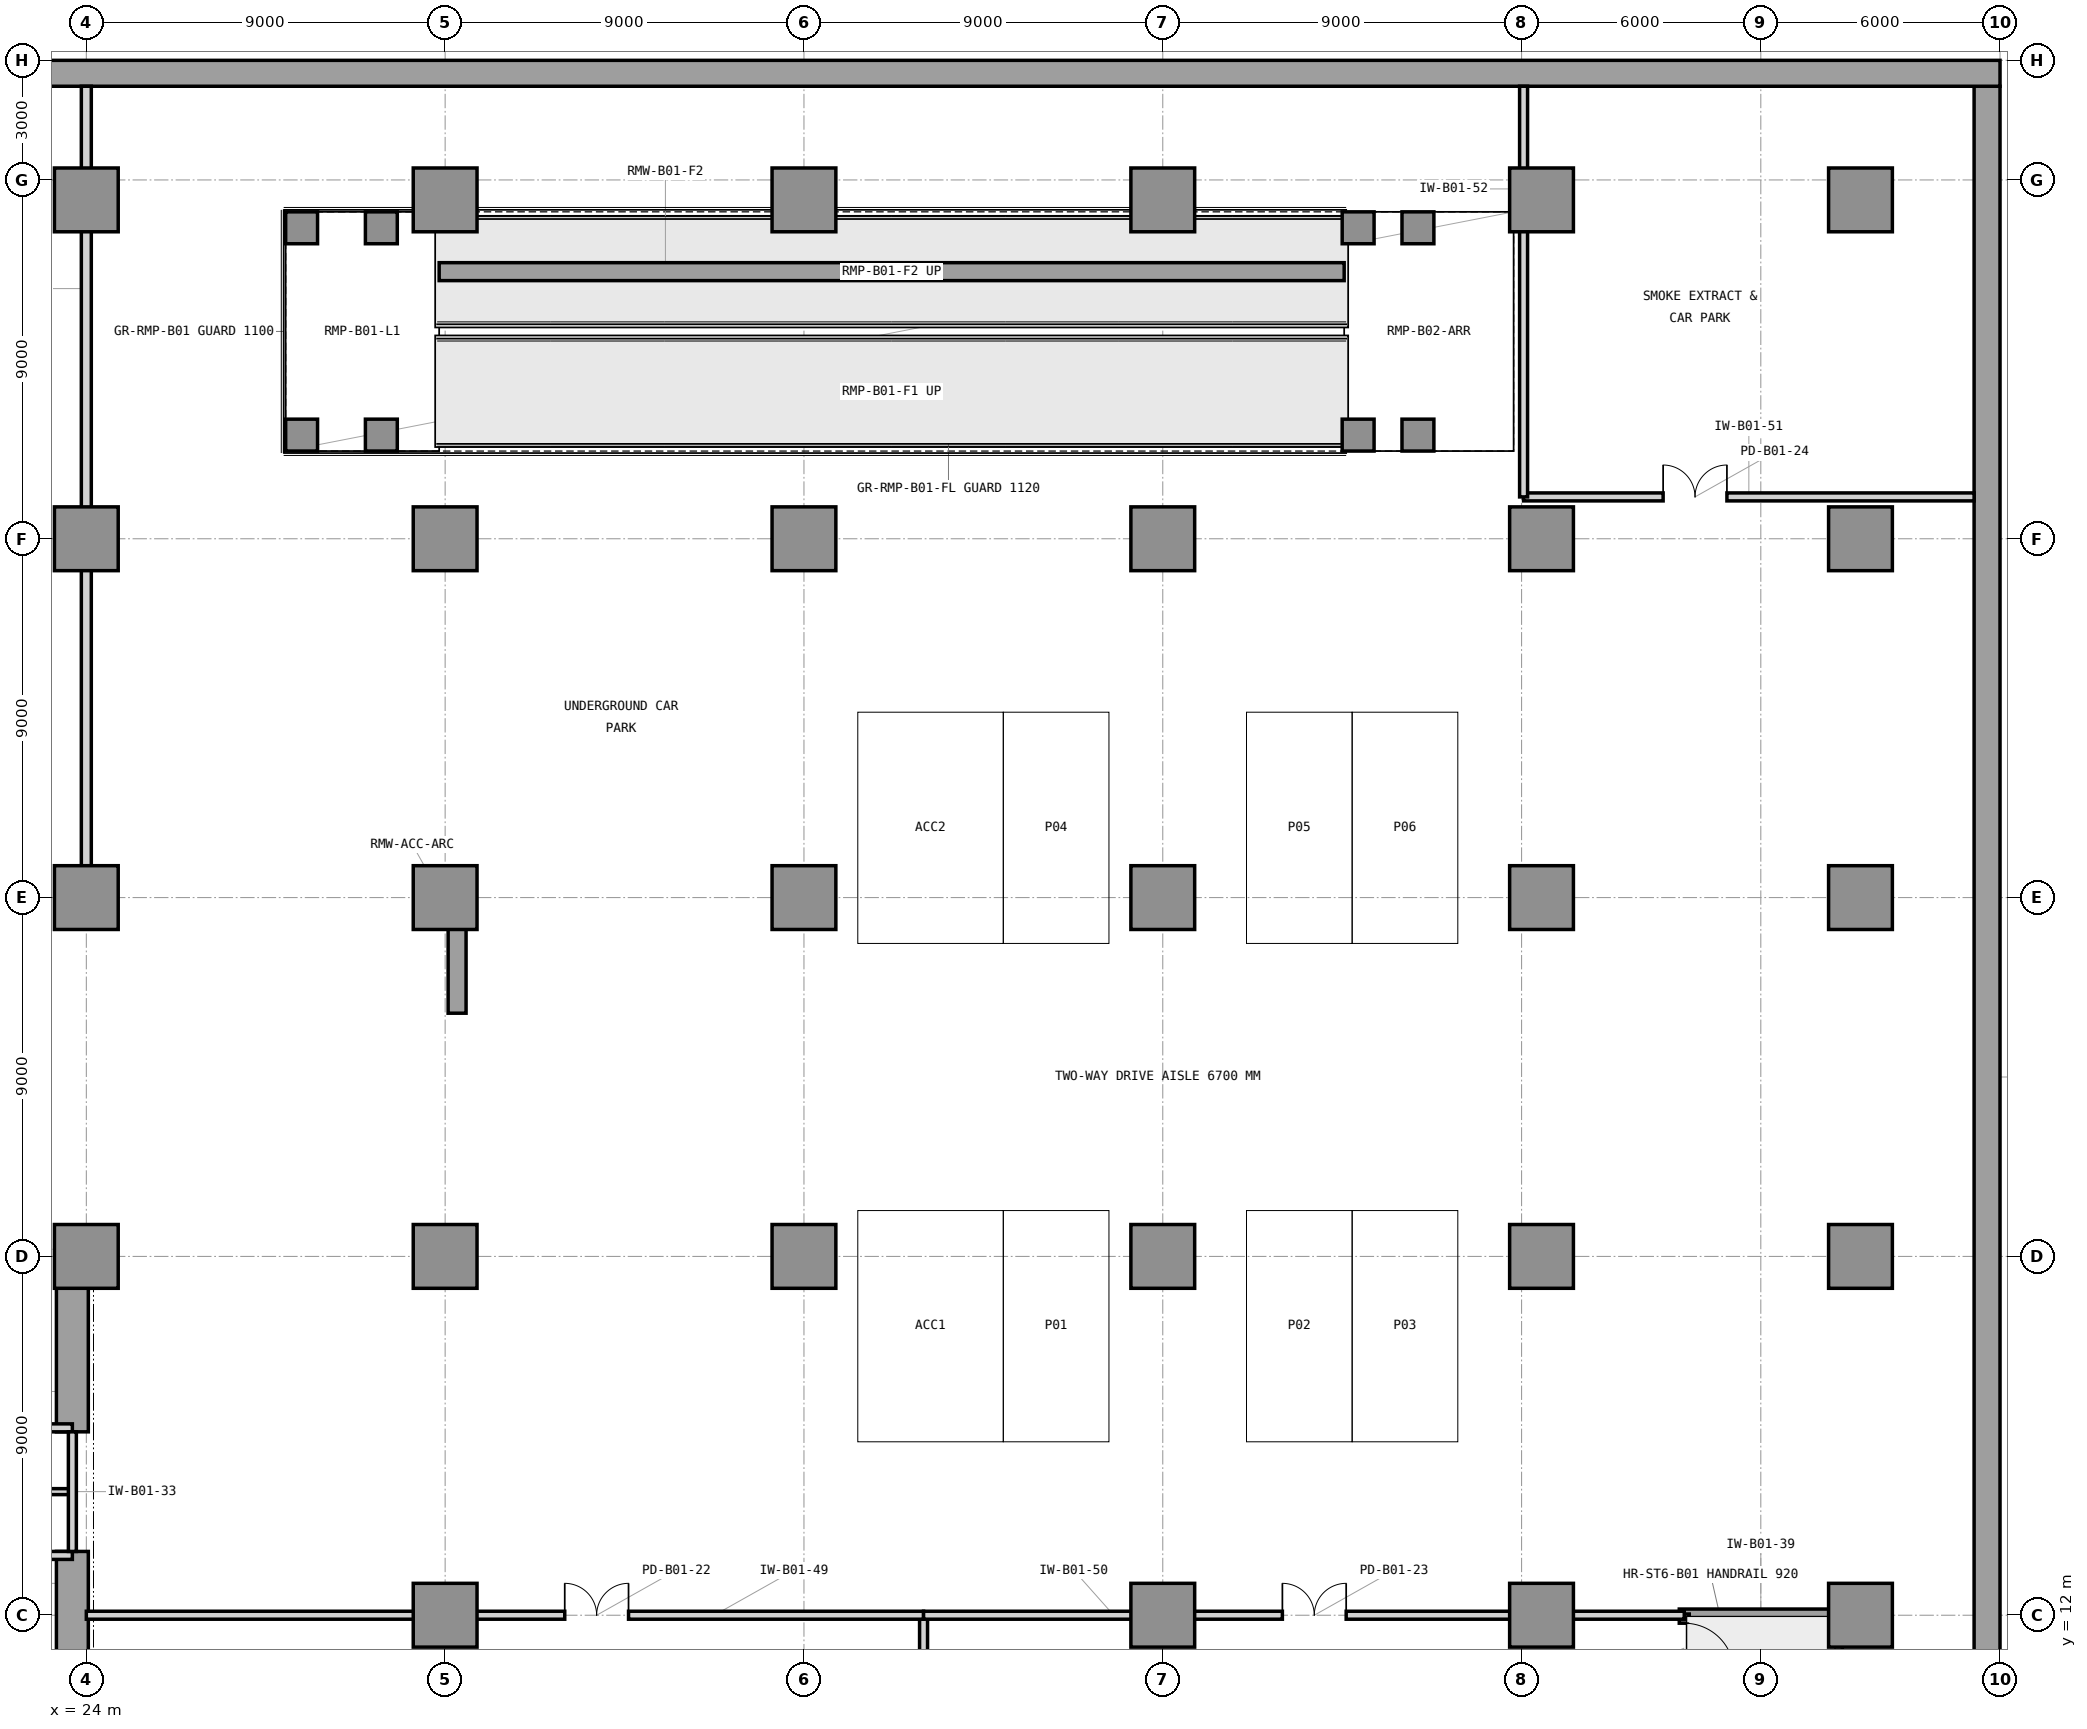
"""IFC4 building model, lengths in metres.
Left out: names, types, materials, properties, quantities, classifications, styles, units other than length and angle.
Written with IfcOpenShell. Run it as: python <this file> out.ifc"""

import sys

from ifc_helpers import new_model, si_unit, direction, frame, frame_2d, origin, origin_2d, place, context, subcontext, project, spatial, rectangle, extrude, element, fill, save


model = new_model("IFC4")
c1 = context("Model", 3, precision=1e-05, world=origin(), true_north=direction((0.0, 1.0)))
c2 = subcontext(c1, "Body", "Model", "MODEL_VIEW")
j1 = project(units=[si_unit("LENGTHUNIT", "METRE"), si_unit("PLANEANGLEUNIT", "RADIAN")], contexts=[c1])
p1 = place(None, origin())
s1 = spatial("IfcSite", under=j1, at=p1, CompositionType="ELEMENT")
p2 = place(p1, origin())
s2 = spatial("IfcBuilding", under=s1, at=p2, CompositionType="ELEMENT")
p3 = place(p2, frame((0.0, 0.0, -4.5)))
s3 = spatial("IfcBuildingStorey", under=s2, at=p3, CompositionType="ELEMENT", Elevation=-4.5)
p4 = place(p3, frame((71.675, 0.65, 0.0), z_axis=(0.0, 0.0, 1.0), x_axis=(0.0, 1.0, 0.0)))
e1 = element("IfcWall", 1, at=p4, inside=s3, PredefinedType="USERDEFINED", context=c2, shape_type="SweptSolid", body=[
    extrude(rectangle(XDim=49.7, YDim=0.65, at=frame_2d((24.85, 0.0))), origin(), (0.0, 0.0, 1.0), 4.5),
])
p5 = place(p3, frame((72.0, 50.675, 0.0), z_axis=(0.0, 0.0, 1.0), x_axis=(-1.0, 0.0, 0.0)))
e2 = element("IfcWall", 2, at=p5, inside=s3, PredefinedType="USERDEFINED", context=c2, shape_type="SweptSolid", body=[
    extrude(rectangle(XDim=72.0, YDim=0.65, at=frame_2d((36.0, 0.0))), origin(), (0.0, 0.0, 1.0), 4.5),
])
p6 = place(p3, frame((23.65, 10.4, 0.0), z_axis=(0.0, 0.0, 1.0), x_axis=(0.0, 1.0, 0.0)))
e3 = element("IfcWall", 3, at=p6, inside=s3, PredefinedType="SHEAR", context=c2, shape_type="SweptSolid", body=[
    extrude(rectangle(XDim=3.2, YDim=0.8, at=frame_2d((1.6, 0.0))), origin(), (0.0, 0.0, 1.0), 4.5),
])
p7 = place(p3, frame((23.65, 16.6, 0.0), z_axis=(0.0, 0.0, 1.0), x_axis=(0.0, 1.0, 0.0)))
e4 = element("IfcWall", 4, at=p7, inside=s3, PredefinedType="SHEAR", context=c2, shape_type="SweptSolid", body=[
    extrude(rectangle(XDim=4.05, YDim=0.8, at=frame_2d((2.025, 0.0))), origin(), (0.0, 0.0, 1.0), 4.5),
])
for number, where, z_axis, x_axis in (
    (5, (24.0, 21.0, 0.0), (0.0, 0.0, 1.0), (1.0, 0.0, 0.0)),
    (6, (24.0, 30.0, 0.0), (0.0, 0.0, 1.0), (1.0, 0.0, 0.0)),
    (7, (24.0, 39.0, 0.0), (0.0, 0.0, 1.0), (1.0, 0.0, 0.0)),
    (8, (24.0, 47.5, 0.0), (0.0, 0.0, 1.0), (1.0, 0.0, 0.0)),
    (9, (33.0, 12.0, 0.0), (0.0, 0.0, 1.0), (1.0, 0.0, 0.0)),
    (10, (33.0, 21.0, 0.0), (0.0, 0.0, 1.0), (1.0, 0.0, 0.0)),
    (11, (33.0, 30.0, 0.0), (0.0, 0.0, 1.0), (1.0, 0.0, 0.0)),
    (12, (33.0, 39.0, 0.0), (0.0, 0.0, 1.0), (1.0, 0.0, 0.0)),
    (13, (33.0, 47.5, 0.0), (0.0, 0.0, 1.0), (1.0, 0.0, 0.0)),
    (14, (42.0, 21.0, 0.0), (0.0, 0.0, 1.0), (1.0, 0.0, 0.0)),
    (15, (42.0, 30.0, 0.0), (0.0, 0.0, 1.0), (1.0, 0.0, 0.0)),
    (16, (42.0, 39.0, 0.0), (0.0, 0.0, 1.0), (1.0, 0.0, 0.0)),
    (17, (42.0, 47.5, 0.0), (0.0, 0.0, 1.0), (1.0, 0.0, 0.0)),
    (18, (51.0, 12.0, 0.0), (0.0, 0.0, 1.0), (1.0, 0.0, 0.0)),
    (19, (51.0, 21.0, 0.0), (0.0, 0.0, 1.0), (1.0, 0.0, 0.0)),
    (20, (51.0, 30.0, 0.0), (0.0, 0.0, 1.0), (1.0, 0.0, 0.0)),
    (21, (51.0, 39.0, 0.0), (0.0, 0.0, 1.0), (1.0, 0.0, 0.0)),
    (22, (51.0, 47.5, 0.0), (0.0, 0.0, 1.0), (1.0, 0.0, 0.0)),
    (23, (60.5, 12.0, 0.0), (0.0, 0.0, 1.0), (1.0, 0.0, 0.0)),
    (24, (60.5, 21.0, 0.0), (0.0, 0.0, 1.0), (1.0, 0.0, 0.0)),
    (25, (60.5, 30.0, 0.0), (0.0, 0.0, 1.0), (1.0, 0.0, 0.0)),
    (26, (60.5, 39.0, 0.0), (0.0, 0.0, 1.0), (1.0, 0.0, 0.0)),
    (27, (60.5, 47.5, 0.0), (0.0, 0.0, 1.0), (1.0, 0.0, 0.0)),
    (28, (68.5, 12.0, 0.0), (0.0, 0.0, 1.0), (1.0, 0.0, 0.0)),
    (29, (68.5, 21.0, 0.0), (0.0, 0.0, 1.0), (1.0, 0.0, 0.0)),
    (30, (68.5, 30.0, 0.0), (0.0, 0.0, 1.0), (1.0, 0.0, 0.0)),
    (31, (68.5, 39.0, 0.0), (0.0, 0.0, 1.0), (1.0, 0.0, 0.0)),
    (32, (68.5, 47.5, 0.0), (0.0, 0.0, 1.0), (1.0, 0.0, 0.0)),
):
    element("IfcColumn", number, at=place(p3, frame(where, z_axis=z_axis, x_axis=x_axis)), inside=s3, PredefinedType="COLUMN", context=c2, shape_type="SweptSolid", body=[
        extrude(rectangle(XDim=1.6, YDim=1.6, at=origin_2d()), origin(), (0.0, 0.0, 1.0), 4.5),
    ])
p8 = place(p3, frame((16.45, 16.7, 0.0), z_axis=(0.0, 0.0, 1.0), x_axis=(1.0, 0.0, 0.0)))
e33 = element("IfcWall", 33, at=p8, inside=s3, PredefinedType="PARTITIONING", context=c2, shape_type="SweptSolid", body=[
    extrude(rectangle(XDim=7.2, YDim=0.2, at=frame_2d((3.6, 0.0))), origin(), (0.0, 0.0, 1.0), 3.573),
])
p9 = place(p8, frame((0.25, 0.0, 0.0)))
e34 = element("IfcOpeningElement", 34, at=p9, cuts=e33, PredefinedType="OPENING", context=c2, shape_type="SweptSolid", body=[
    extrude(rectangle(XDim=1.2, YDim=2.2, at=frame_2d((0.6, 1.1))), frame((0.0, 0.11, 0.0), z_axis=(0.0, -1.0, 0.0), x_axis=(1.0, 0.0, 0.0)), (0.0, 0.0, 1.0), 0.22),
])
p10 = place(p3, frame((14.7, 13.5, 0.0), z_axis=(0.0, 0.0, 1.0), x_axis=(1.0, 0.0, 0.0)))
e35 = element("IfcWall", 35, at=p10, inside=s3, PredefinedType="PARTITIONING", context=c2, shape_type="SweptSolid", body=[
    extrude(rectangle(XDim=8.95, YDim=0.2, at=frame_2d((4.475, 0.0))), origin(), (0.0, 0.0, 1.0), 3.573),
])
p11 = place(p3, frame((18.25, 15.1, 0.0), z_axis=(0.0, 0.0, 1.0), x_axis=(1.0, 0.0, 0.0)))
e36 = element("IfcWall", 36, at=p11, inside=s3, PredefinedType="PARTITIONING", context=c2, shape_type="SweptSolid", body=[
    extrude(rectangle(XDim=5.4, YDim=0.15, at=frame_2d((2.7, 0.0))), origin(), (0.0, 0.0, 1.0), 4.19),
])
p12 = place(p3, frame((23.65, 13.6, 0.0), z_axis=(0.0, 0.0, 1.0), x_axis=(0.0, 1.0, 0.0)))
e37 = element("IfcWall", 37, at=p12, inside=s3, PredefinedType="PARTITIONING", context=c2, shape_type="SweptSolid", body=[
    extrude(rectangle(XDim=3.0, YDim=0.2, at=frame_2d((1.5, 0.0))), origin(), (0.0, 0.0, 1.0), 4.19),
])
p13 = place(p3, frame((63.955, 12.03, 0.0), z_axis=(0.0, 0.0, 1.0), x_axis=(1.0, 0.0, 0.0)))
e38 = element("IfcWall", 38, at=p13, inside=s3, PredefinedType="SHEAR", context=c2, shape_type="SweptSolid", body=[
    extrude(rectangle(XDim=4.09, YDim=0.25, at=frame_2d((2.045, 0.0))), origin(), (0.0, 0.0, 1.0), 4.5),
])
p14 = place(p3, frame((67.92, 4.53, 0.0), z_axis=(0.0, 0.0, 1.0), x_axis=(0.0, 1.0, 0.0)))
e39 = element("IfcWall", 39, at=p14, inside=s3, PredefinedType="SHEAR", context=c2, shape_type="SweptSolid", body=[
    extrude(rectangle(XDim=7.5, YDim=0.25, at=frame_2d((3.75, 0.0))), origin(), (0.0, 0.0, 1.0), 4.5),
])
p15 = place(p3, frame((64.08, 4.53, 0.0), z_axis=(0.0, 0.0, 1.0), x_axis=(0.0, 1.0, 0.0)))
e40 = element("IfcWall", 40, at=p15, inside=s3, PredefinedType="SHEAR", context=c2, shape_type="SweptSolid", body=[
    extrude(rectangle(XDim=7.5, YDim=0.25, at=frame_2d((3.75, 0.0))), origin(), (0.0, 0.0, 1.0), 4.5),
])
p16 = place(p15, frame((6.02, 0.0, 0.0)))
e41 = element("IfcOpeningElement", 41, at=p16, cuts=e40, PredefinedType="OPENING", context=c2, shape_type="SweptSolid", body=[
    extrude(rectangle(XDim=1.25, YDim=2.2, at=frame_2d((0.625, 1.1))), frame((0.0, 0.135, 0.0), z_axis=(0.0, -1.0, 0.0), x_axis=(1.0, 0.0, 0.0)), (0.0, 0.0, 1.0), 0.27),
])
p17 = place(p3, frame((24.0, 30.05, 0.0), z_axis=(0.0, 0.0, 1.0), x_axis=(0.0, 1.0, 0.0)))
e42 = element("IfcWall", 42, at=p17, inside=s3, PredefinedType="PARTITIONING", context=c2, shape_type="SweptSolid", body=[
    extrude(rectangle(XDim=20.3, YDim=0.25, at=frame_2d((10.15, 0.0))), origin(), (0.0, 0.0, 1.0), 3.334),
])
p18 = place(p3, frame((45.0, 0.65, 0.0), z_axis=(0.0, 0.0, 1.0), x_axis=(0.0, 1.0, 0.0)))
e43 = element("IfcWall", 43, at=p18, inside=s3, PredefinedType="PARTITIONING", context=c2, shape_type="SweptSolid", body=[
    extrude(rectangle(XDim=11.35, YDim=0.2, at=frame_2d((5.675, 0.0))), origin(), (0.0, 0.0, 1.0), 4.19),
])
p19 = place(p3, frame((24.0, 12.0, 0.0), z_axis=(0.0, 0.0, 1.0), x_axis=(1.0, 0.0, 0.0)))
e44 = element("IfcWall", 44, at=p19, inside=s3, PredefinedType="PARTITIONING", context=c2, shape_type="SweptSolid", body=[
    extrude(rectangle(XDim=21.0, YDim=0.2, at=frame_2d((10.5, 0.0))), origin(), (0.0, 0.0, 1.0), 3.334),
])
p20 = place(p19, frame((12.0, 0.0, 0.0)))
e45 = element("IfcOpeningElement", 45, at=p20, cuts=e44, PredefinedType="OPENING", context=c2, shape_type="SweptSolid", body=[
    extrude(rectangle(XDim=1.6, YDim=2.3, at=frame_2d((0.8, 1.15))), frame((0.0, 0.11, 0.0), z_axis=(0.0, -1.0, 0.0), x_axis=(1.0, 0.0, 0.0)), (0.0, 0.0, 1.0), 0.22),
])
p21 = place(p3, frame((45.0, 12.0, 0.0), z_axis=(0.0, 0.0, 1.0), x_axis=(1.0, 0.0, 0.0)))
e46 = element("IfcWall", 46, at=p21, inside=s3, PredefinedType="PARTITIONING", context=c2, shape_type="SweptSolid", body=[
    extrude(rectangle(XDim=19.08, YDim=0.2, at=frame_2d((9.54, 0.0))), origin(), (0.0, 0.0, 1.0), 3.334),
])
p22 = place(p21, frame((9.0, 0.0, 0.0)))
e47 = element("IfcOpeningElement", 47, at=p22, cuts=e46, PredefinedType="OPENING", context=c2, shape_type="SweptSolid", body=[
    extrude(rectangle(XDim=1.6, YDim=2.3, at=frame_2d((0.8, 1.15))), frame((0.0, 0.11, 0.0), z_axis=(0.0, -1.0, 0.0), x_axis=(1.0, 0.0, 0.0)), (0.0, 0.0, 1.0), 0.22),
])
p23 = place(p3, frame((60.05, 40.05, 0.0), z_axis=(0.0, 0.0, 1.0), x_axis=(1.0, 0.0, 0.0)))
e48 = element("IfcWall", 48, at=p23, inside=s3, PredefinedType="PARTITIONING", context=c2, shape_type="SweptSolid", body=[
    extrude(rectangle(XDim=11.3, YDim=0.2, at=frame_2d((5.65, 0.0))), origin(), (0.0, 0.0, 1.0), 4.19),
])
p24 = place(p23, frame((3.5, 0.0, 0.0)))
e49 = element("IfcOpeningElement", 49, at=p24, cuts=e48, PredefinedType="OPENING", context=c2, shape_type="SweptSolid", body=[
    extrude(rectangle(XDim=1.6, YDim=2.3, at=frame_2d((0.8, 1.15))), frame((0.0, 0.11, 0.0), z_axis=(0.0, -1.0, 0.0), x_axis=(1.0, 0.0, 0.0)), (0.0, 0.0, 1.0), 0.22),
])
p25 = place(p3, frame((60.05, 40.05, 0.0), z_axis=(0.0, 0.0, 1.0), x_axis=(0.0, 1.0, 0.0)))
e50 = element("IfcWall", 50, at=p25, inside=s3, PredefinedType="PARTITIONING", context=c2, shape_type="SweptSolid", body=[
    extrude(rectangle(XDim=10.3, YDim=0.2, at=frame_2d((5.15, 0.0))), origin(), (0.0, 0.0, 1.0), 3.334),
])
for number, where, z_axis, x_axis in (
    (51, (29.4, 41.6, 0.0), (0.0, 0.0, 1.0), (1.0, 0.0, 0.0)),
    (52, (29.4, 46.8, 0.0), (0.0, 0.0, 1.0), (1.0, 0.0, 0.0)),
    (53, (31.4, 41.6, 0.0), (0.0, 0.0, 1.0), (1.0, 0.0, 0.0)),
    (54, (31.4, 46.8, 0.0), (0.0, 0.0, 1.0), (1.0, 0.0, 0.0)),
    (55, (55.9, 41.6, 0.0), (0.0, 0.0, 1.0), (1.0, 0.0, 0.0)),
    (56, (55.9, 46.8, 0.0), (0.0, 0.0, 1.0), (1.0, 0.0, 0.0)),
    (57, (57.4, 41.6, 0.0), (0.0, 0.0, 1.0), (1.0, 0.0, 0.0)),
    (58, (57.4, 46.8, 0.0), (0.0, 0.0, 1.0), (1.0, 0.0, 0.0)),
):
    element("IfcColumn", number, at=place(p3, frame(where, z_axis=z_axis, x_axis=x_axis)), inside=s3, PredefinedType="COLUMN", context=c2, shape_type="SweptSolid", body=[
        extrude(rectangle(XDim=0.8, YDim=0.8, at=origin_2d()), origin(), (0.0, 0.0, 1.0), 4.5),
    ])
p26 = place(p3, frame((32.85, 45.7, 0.0), z_axis=(0.0, 0.0, 1.0), x_axis=(1.0, 0.0, 0.0)))
e59 = element("IfcWall", 59, at=p26, inside=s3, PredefinedType="SHEAR", context=c2, shape_type="SweptSolid", body=[
    extrude(rectangle(XDim=22.7, YDim=0.45, at=frame_2d((11.35, 0.0))), origin(), (0.0, 0.0, 1.0), 2.01),
])
p27 = place(p3, frame((33.3, 27.1, 0.0), z_axis=(0.0, 0.0, 1.0), x_axis=(0.0, 1.0, 0.0)))
e60 = element("IfcWall", 60, at=p27, inside=s3, PredefinedType="SHEAR", context=c2, shape_type="SweptSolid", body=[
    extrude(rectangle(XDim=2.98, YDim=0.45, at=frame_2d((1.49, 0.0))), origin(), (0.0, 0.0, 1.0), 4.22),
])
p28 = place(p16, frame((1.25, 0.0, 0.0), z_axis=(0.0, 0.0, 1.0), x_axis=(-1.0, 0.0, 0.0)))
e61 = element("IfcDoor", 61, at=p28, inside=s3, OperationType="SINGLE_SWING_RIGHT", PredefinedType="DOOR", context=c2, shape_type="SweptSolid", body=[
    extrude(rectangle(XDim=1.25, YDim=2.2, at=frame_2d((0.625, 1.1))), frame((0.0, 0.025, 0.0), z_axis=(0.0, -1.0, 0.0), x_axis=(1.0, 0.0, 0.0)), (0.0, 0.0, 1.0), 0.05),
])
fill(e41, e61)
p29 = place(p20, origin())
e62 = element("IfcDoor", 62, at=p29, inside=s3, OperationType="DOUBLE_DOOR_SINGLE_SWING", PredefinedType="DOOR", context=c2, shape_type="SweptSolid", body=[
    extrude(rectangle(XDim=1.6, YDim=2.3, at=frame_2d((0.8, 1.15))), frame((0.0, 0.025, 0.0), z_axis=(0.0, -1.0, 0.0), x_axis=(1.0, 0.0, 0.0)), (0.0, 0.0, 1.0), 0.05),
])
fill(e45, e62)
p30 = place(p22, origin())
e63 = element("IfcDoor", 63, at=p30, inside=s3, OperationType="DOUBLE_DOOR_SINGLE_SWING", PredefinedType="DOOR", context=c2, shape_type="SweptSolid", body=[
    extrude(rectangle(XDim=1.6, YDim=2.3, at=frame_2d((0.8, 1.15))), frame((0.0, 0.025, 0.0), z_axis=(0.0, -1.0, 0.0), x_axis=(1.0, 0.0, 0.0)), (0.0, 0.0, 1.0), 0.05),
])
fill(e47, e63)
p31 = place(p24, origin())
e64 = element("IfcDoor", 64, at=p31, inside=s3, OperationType="DOUBLE_DOOR_SINGLE_SWING", PredefinedType="DOOR", context=c2, shape_type="SweptSolid", body=[
    extrude(rectangle(XDim=1.6, YDim=2.3, at=frame_2d((0.8, 1.15))), frame((0.0, 0.025, 0.0), z_axis=(0.0, -1.0, 0.0), x_axis=(1.0, 0.0, 0.0)), (0.0, 0.0, 1.0), 0.05),
])
fill(e49, e64)
save(model, sys.argv[1])
